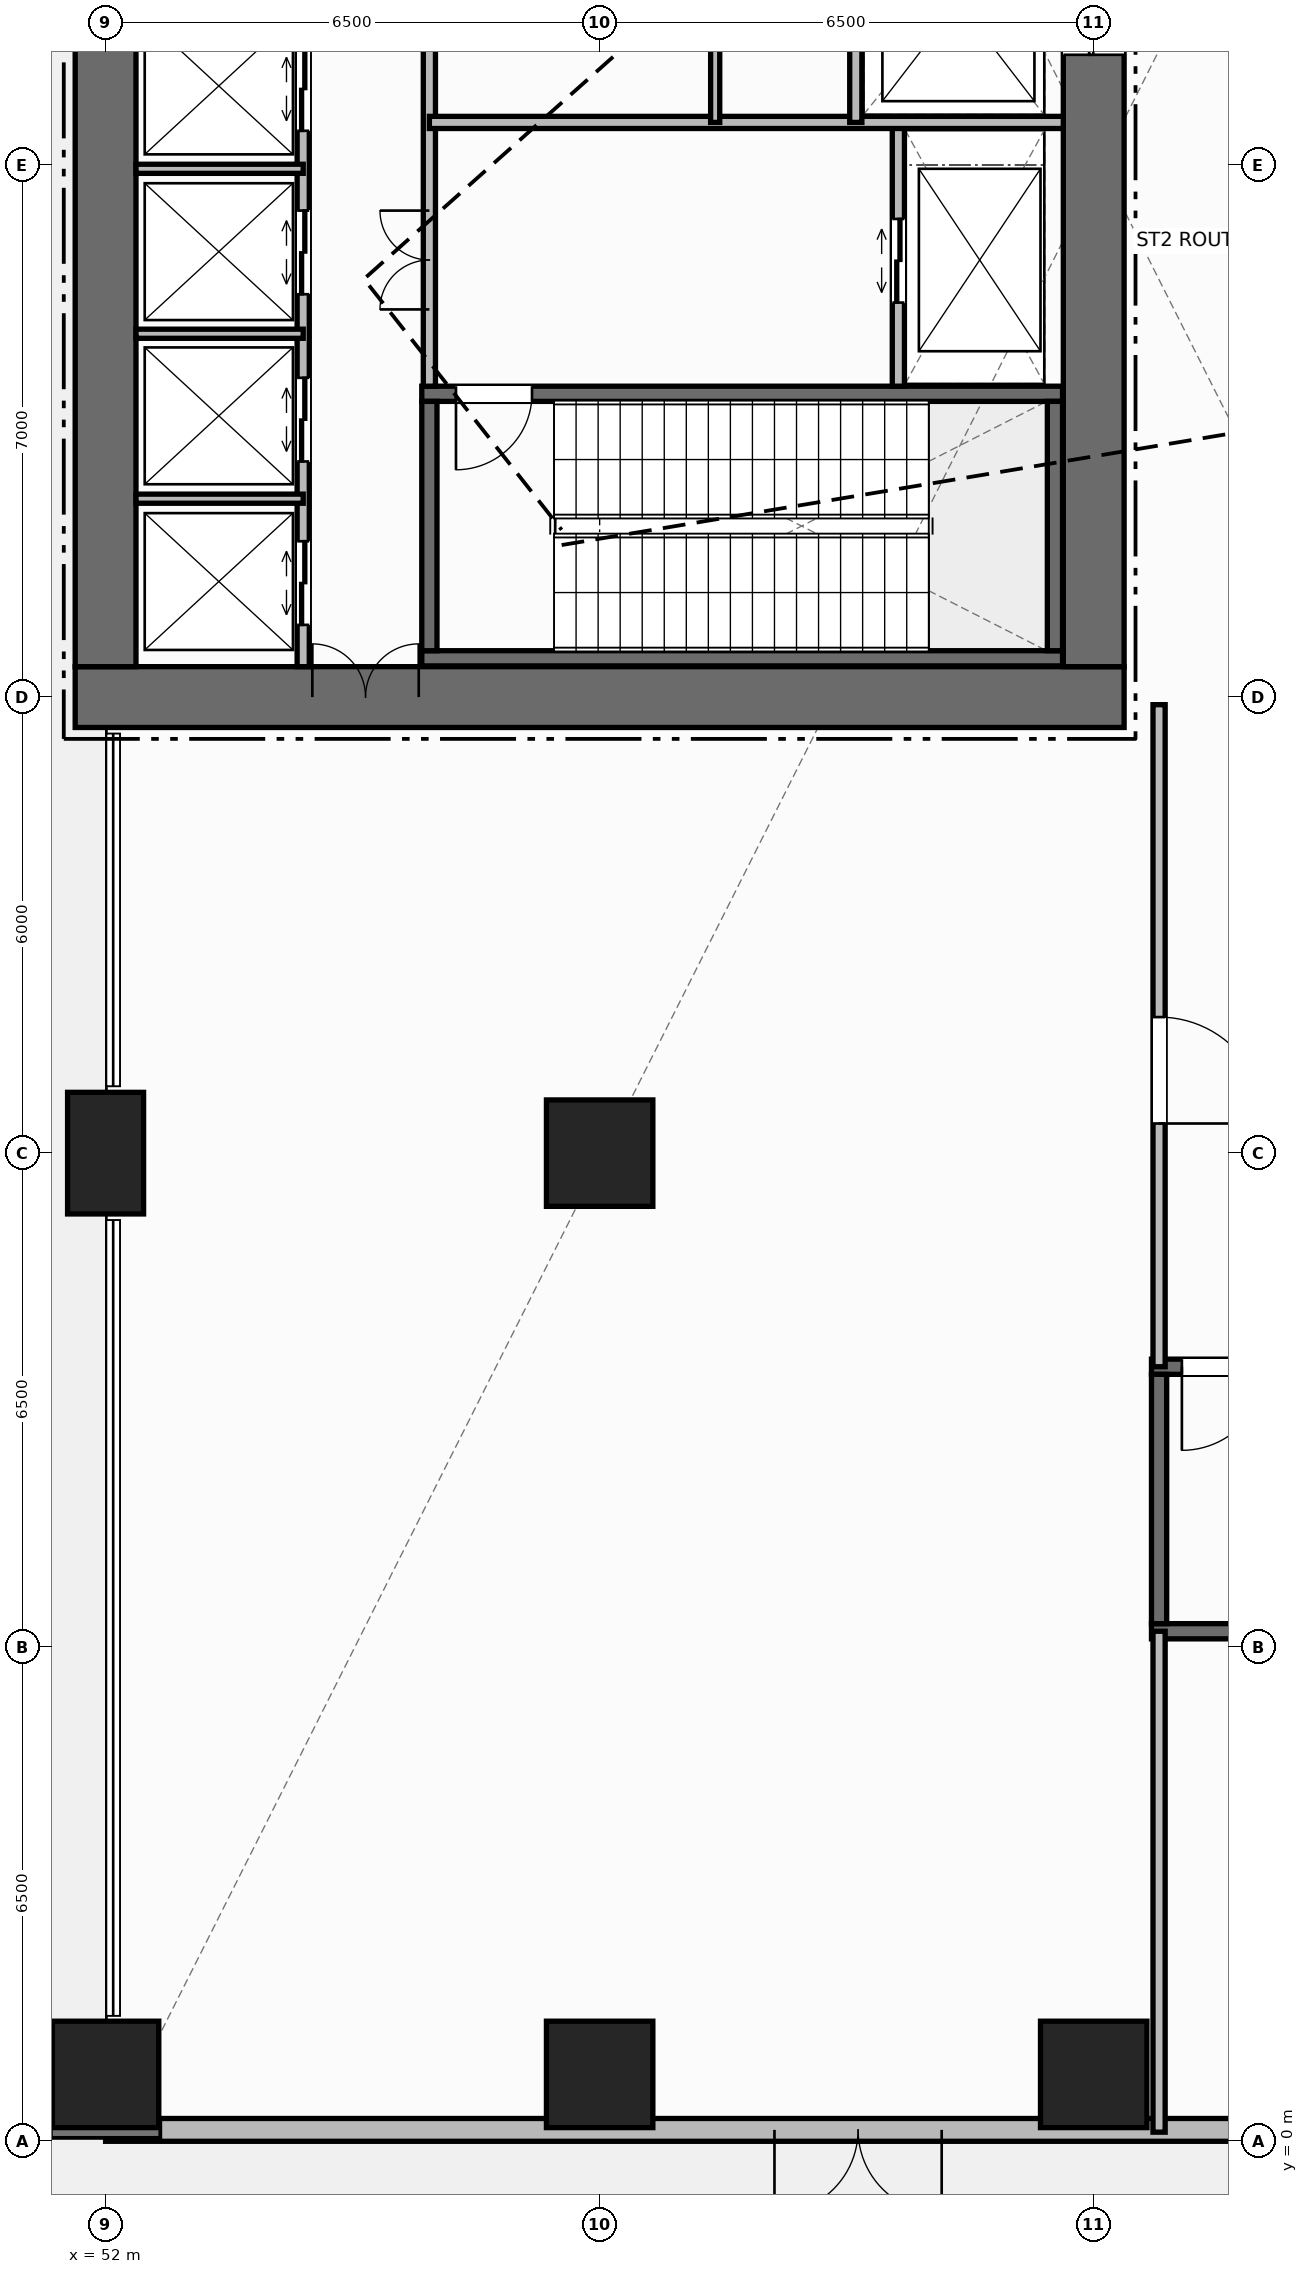
"""IFC4 building model, lengths in metres.
Left out: names, types, materials, properties, quantities, classifications, styles, units other than length and angle.
Written with IfcOpenShell. Run it as: python <this file> out.ifc"""

import sys

from ifc_helpers import new_model, si_unit, direction, frame, frame_2d, origin, origin_2d, place, context, subcontext, project, spatial, rectangle, extrude, element, fill, save


model = new_model("IFC4")
c1 = context("Model", 3, precision=1e-05, world=origin(), true_north=direction((0.0, 1.0)))
c2 = subcontext(c1, "Body", "Model", "MODEL_VIEW")
j1 = project(units=[si_unit("LENGTHUNIT", "METRE"), si_unit("PLANEANGLEUNIT", "RADIAN")], contexts=[c1])
p1 = place(None, origin())
s1 = spatial("IfcSite", under=j1, at=p1, CompositionType="ELEMENT")
p2 = place(p1, origin())
s2 = spatial("IfcBuilding", under=s1, at=p2, CompositionType="ELEMENT")
p3 = place(p2, origin())
s3 = spatial("IfcBuildingStorey", under=s2, at=p3, CompositionType="ELEMENT", Elevation=0.0)
p4 = place(p3, frame((51.6, 19.0, 0.0), z_axis=(0.0, 0.0, 1.0), x_axis=(1.0, 0.0, 0.0)))
e1 = element("IfcWall", 1, at=p4, inside=s3, PredefinedType="SHEAR", context=c2, shape_type="SweptSolid", body=[
    extrude(rectangle(XDim=13.8, YDim=0.8, at=frame_2d((6.9, 0.0))), origin(), (0.0, 0.0, 1.0), 6.0),
])
p5 = place(p4, frame((3.12, 0.0, 0.0)))
e2 = element("IfcOpeningElement", 2, at=p5, cuts=e1, PredefinedType="OPENING", context=c2, shape_type="SweptSolid", body=[
    extrude(rectangle(XDim=1.4, YDim=2.2, at=frame_2d((0.7, 1.1))), frame((0.0, 0.41, 0.0), z_axis=(0.0, -1.0, 0.0), x_axis=(1.0, 0.0, 0.0)), (0.0, 0.0, 1.0), 0.82),
])
p6 = place(p3, frame((52.0, 19.4, 0.0), z_axis=(0.0, 0.0, 1.0), x_axis=(0.0, 1.0, 0.0)))
e3 = element("IfcWall", 3, at=p6, inside=s3, PredefinedType="SHEAR", context=c2, shape_type="SweptSolid", body=[
    extrude(rectangle(XDim=13.2, YDim=0.8, at=frame_2d((6.6, 0.0))), origin(), (0.0, 0.0, 1.0), 6.0),
])
p7 = place(p3, frame((65.0, 19.4, 0.0), z_axis=(0.0, 0.0, 1.0), x_axis=(0.0, 1.0, 0.0)))
e4 = element("IfcWall", 4, at=p7, inside=s3, PredefinedType="SHEAR", context=c2, shape_type="SweptSolid", body=[
    extrude(rectangle(XDim=13.2, YDim=0.8, at=frame_2d((6.6, 0.0))), origin(), (0.0, 0.0, 1.0), 6.0),
])
p8 = place(p7, frame((8.05, 0.0, 0.0)))
e5 = element("IfcOpeningElement", 5, at=p8, cuts=e4, PredefinedType="OPENING", context=c2, shape_type="SweptSolid", body=[
    extrude(rectangle(XDim=1.3, YDim=2.2, at=frame_2d((0.65, 1.1))), frame((0.0, 0.41, 0.0), z_axis=(0.0, -1.0, 0.0), x_axis=(1.0, 0.0, 0.0)), (0.0, 0.0, 1.0), 0.82),
])
p9 = place(p3, frame((56.16, 19.51, 0.0), z_axis=(0.0, 0.0, 1.0), x_axis=(1.0, 0.0, 0.0)))
e6 = element("IfcWall", 6, at=p9, inside=s3, PredefinedType="SHEAR", context=c2, shape_type="SweptSolid", body=[
    extrude(rectangle(XDim=8.43, YDim=0.2, at=frame_2d((4.215, 0.0))), origin(), (0.0, 0.0, 1.0), 6.0),
])
p10 = place(p3, frame((56.16, 22.99, 0.0), z_axis=(0.0, 0.0, 1.0), x_axis=(1.0, 0.0, 0.0)))
e7 = element("IfcWall", 7, at=p10, inside=s3, PredefinedType="SHEAR", context=c2, shape_type="SweptSolid", body=[
    extrude(rectangle(XDim=8.43, YDim=0.2, at=frame_2d((4.215, 0.0))), origin(), (0.0, 0.0, 1.0), 6.0),
])
p11 = place(p10, frame((0.45, 0.0, 0.0)))
e8 = element("IfcOpeningElement", 8, at=p11, cuts=e7, PredefinedType="OPENING", context=c2, shape_type="SweptSolid", body=[
    extrude(rectangle(XDim=1.0, YDim=2.15, at=frame_2d((0.5, 1.075))), frame((0.0, 0.11, 0.0), z_axis=(0.0, -1.0, 0.0), x_axis=(1.0, 0.0, 0.0)), (0.0, 0.0, 1.0), 0.22),
])
for number, where, z_axis, x_axis in (
    (9, (56.26, 19.61, 0.0), (0.0, 0.0, 1.0), (0.0, 1.0, 0.0)),
    (10, (64.49, 19.61, 0.0), (0.0, 0.0, 1.0), (0.0, 1.0, 0.0)),
):
    element("IfcWall", number, at=place(p3, frame(where, z_axis=z_axis, x_axis=x_axis)), inside=s3, PredefinedType="SHEAR", context=c2, shape_type="SweptSolid", body=[
        extrude(rectangle(XDim=3.28, YDim=0.2, at=frame_2d((1.64, 0.0))), origin(), (0.0, 0.0, 1.0), 6.0),
    ])
p12 = place(p3, frame((65.76, 6.71, 0.0), z_axis=(0.0, 0.0, 1.0), x_axis=(1.0, 0.0, 0.0)))
e11 = element("IfcWall", 11, at=p12, inside=s3, PredefinedType="SHEAR", context=c2, shape_type="SweptSolid", body=[
    extrude(rectangle(XDim=8.43, YDim=0.2, at=frame_2d((4.215, 0.0))), origin(), (0.0, 0.0, 1.0), 6.0),
])
p13 = place(p3, frame((65.76, 10.19, 0.0), z_axis=(0.0, 0.0, 1.0), x_axis=(1.0, 0.0, 0.0)))
e12 = element("IfcWall", 12, at=p13, inside=s3, PredefinedType="SHEAR", context=c2, shape_type="SweptSolid", body=[
    extrude(rectangle(XDim=8.43, YDim=0.2, at=frame_2d((4.215, 0.0))), origin(), (0.0, 0.0, 1.0), 6.0),
])
p14 = place(p13, frame((0.4, 0.0, 0.0)))
e13 = element("IfcOpeningElement", 13, at=p14, cuts=e12, PredefinedType="OPENING", context=c2, shape_type="SweptSolid", body=[
    extrude(rectangle(XDim=1.1, YDim=2.15, at=frame_2d((0.55, 1.075))), frame((0.0, 0.11, 0.0), z_axis=(0.0, -1.0, 0.0), x_axis=(1.0, 0.0, 0.0)), (0.0, 0.0, 1.0), 0.22),
])
p15 = place(p3, frame((65.86, 6.81, 0.0), z_axis=(0.0, 0.0, 1.0), x_axis=(0.0, 1.0, 0.0)))
e14 = element("IfcWall", 14, at=p15, inside=s3, PredefinedType="SHEAR", context=c2, shape_type="SweptSolid", body=[
    extrude(rectangle(XDim=3.28, YDim=0.2, at=frame_2d((1.64, 0.0))), origin(), (0.0, 0.0, 1.0), 6.0),
])
p16 = place(p3, frame((58.5, 13.0, 0.0), z_axis=(0.0, 0.0, 1.0), x_axis=(1.0, 0.0, 0.0)))
e15 = element("IfcColumn", 15, at=p16, inside=s3, PredefinedType="COLUMN", context=c2, shape_type="SweptSolid", body=[
    extrude(rectangle(XDim=1.4, YDim=1.4, at=origin_2d()), origin(), (0.0, 0.0, 1.0), 6.0),
])
p17 = place(p3, frame((52.0, 13.0, 0.0), z_axis=(0.0, 0.0, 1.0), x_axis=(1.0, 0.0, 0.0)))
e16 = element("IfcColumn", 16, at=p17, inside=s3, PredefinedType="PILASTER", context=c2, shape_type="SweptSolid", body=[
    extrude(rectangle(XDim=1.0, YDim=1.6, at=origin_2d()), origin(), (0.0, 0.0, 1.0), 6.0),
])
for number, where, z_axis, x_axis in (
    (17, (52.0, 0.88, 0.0), (0.0, 0.0, 1.0), (1.0, 0.0, 0.0)),
    (18, (58.5, 0.88, 0.0), (0.0, 0.0, 1.0), (1.0, 0.0, 0.0)),
    (19, (65.0, 0.88, 0.0), (0.0, 0.0, 1.0), (1.0, 0.0, 0.0)),
):
    element("IfcColumn", number, at=place(p3, frame(where, z_axis=z_axis, x_axis=x_axis)), inside=s3, PredefinedType="COLUMN", context=c2, shape_type="SweptSolid", body=[
        extrude(rectangle(XDim=1.4, YDim=1.4, at=origin_2d()), origin(), (0.0, 0.0, 1.0), 6.0),
    ])
p18 = place(p3, frame((75.0, 0.15, 0.0), z_axis=(0.0, 0.0, 1.0), x_axis=(-1.0, 0.0, 0.0)))
e20 = element("IfcWall", 20, at=p18, inside=s3, PredefinedType="STANDARD", context=c2, shape_type="SweptSolid", body=[
    extrude(rectangle(XDim=23.0, YDim=0.3, at=frame_2d((11.5, 0.0))), origin(), (0.0, 0.0, 1.0), 5.72),
])
p19 = place(p18, frame((12.0, 0.0, 0.0)))
e21 = element("IfcOpeningElement", 21, at=p19, cuts=e20, PredefinedType="OPENING", context=c2, shape_type="SweptSolid", body=[
    extrude(rectangle(XDim=2.2, YDim=2.4, at=frame_2d((1.1, 1.2))), frame((0.0, 0.16, 0.0), z_axis=(0.0, -1.0, 0.0), x_axis=(1.0, 0.0, 0.0)), (0.0, 0.0, 1.0), 0.32),
])
p20 = place(p3, frame((54.6, 19.4, 0.0), z_axis=(0.0, 0.0, 1.0), x_axis=(0.0, 1.0, 0.0)))
e22 = element("IfcWall", 22, at=p20, inside=s3, PredefinedType="STANDARD", context=c2, shape_type="SweptSolid", body=[
    extrude(rectangle(XDim=13.2, YDim=0.16, at=frame_2d((6.6, 0.0))), origin(), (0.0, 0.0, 1.0), 5.72),
])
p21 = place(p20, frame((0.55, 0.0, 0.0)))
e23 = element("IfcOpeningElement", 23, at=p21, cuts=e22, PredefinedType="OPENING", context=c2, shape_type="SweptSolid", body=[
    extrude(rectangle(XDim=1.1, YDim=2.2, at=frame_2d((0.55, 1.1))), frame((0.0, 0.09, 0.0), z_axis=(0.0, -1.0, 0.0), x_axis=(1.0, 0.0, 0.0)), (0.0, 0.0, 1.0), 0.18),
])
p22 = place(p20, frame((2.7, 0.0, 0.0)))
e24 = element("IfcOpeningElement", 24, at=p22, cuts=e22, PredefinedType="OPENING", context=c2, shape_type="SweptSolid", body=[
    extrude(rectangle(XDim=1.1, YDim=2.2, at=frame_2d((0.55, 1.1))), frame((0.0, 0.09, 0.0), z_axis=(0.0, -1.0, 0.0), x_axis=(1.0, 0.0, 0.0)), (0.0, 0.0, 1.0), 0.18),
])
p23 = place(p20, frame((4.9, 0.0, 0.0)))
e25 = element("IfcOpeningElement", 25, at=p23, cuts=e22, PredefinedType="OPENING", context=c2, shape_type="SweptSolid", body=[
    extrude(rectangle(XDim=1.1, YDim=2.2, at=frame_2d((0.55, 1.1))), frame((0.0, 0.09, 0.0), z_axis=(0.0, -1.0, 0.0), x_axis=(1.0, 0.0, 0.0)), (0.0, 0.0, 1.0), 0.18),
])
p24 = place(p20, frame((7.05, 0.0, 0.0)))
e26 = element("IfcOpeningElement", 26, at=p24, cuts=e22, PredefinedType="OPENING", context=c2, shape_type="SweptSolid", body=[
    extrude(rectangle(XDim=1.1, YDim=2.2, at=frame_2d((0.55, 1.1))), frame((0.0, 0.09, 0.0), z_axis=(0.0, -1.0, 0.0), x_axis=(1.0, 0.0, 0.0)), (0.0, 0.0, 1.0), 0.18),
])
p25 = place(p20, frame((9.2, 0.0, 0.0)))
e27 = element("IfcOpeningElement", 27, at=p25, cuts=e22, PredefinedType="OPENING", context=c2, shape_type="SweptSolid", body=[
    extrude(rectangle(XDim=1.1, YDim=2.2, at=frame_2d((0.55, 1.1))), frame((0.0, 0.09, 0.0), z_axis=(0.0, -1.0, 0.0), x_axis=(1.0, 0.0, 0.0)), (0.0, 0.0, 1.0), 0.18),
])
p26 = place(p20, frame((11.4, 0.0, 0.0)))
e28 = element("IfcOpeningElement", 28, at=p26, cuts=e22, PredefinedType="OPENING", context=c2, shape_type="SweptSolid", body=[
    extrude(rectangle(XDim=1.1, YDim=2.2, at=frame_2d((0.55, 1.1))), frame((0.0, 0.09, 0.0), z_axis=(0.0, -1.0, 0.0), x_axis=(1.0, 0.0, 0.0)), (0.0, 0.0, 1.0), 0.18),
])
p27 = place(p3, frame((56.26, 23.09, 0.0), z_axis=(0.0, 0.0, 1.0), x_axis=(0.0, 1.0, 0.0)))
e29 = element("IfcWall", 29, at=p27, inside=s3, PredefinedType="STANDARD", context=c2, shape_type="SweptSolid", body=[
    extrude(rectangle(XDim=9.51, YDim=0.16, at=frame_2d((4.755, 0.0))), origin(), (0.0, 0.0, 1.0), 5.72),
])
p28 = place(p27, frame((1.01, 0.0, 0.0)))
e30 = element("IfcOpeningElement", 30, at=p28, cuts=e29, PredefinedType="OPENING", context=c2, shape_type="SweptSolid", body=[
    extrude(rectangle(XDim=1.3, YDim=2.2, at=frame_2d((0.65, 1.1))), frame((0.0, 0.09, 0.0), z_axis=(0.0, -1.0, 0.0), x_axis=(1.0, 0.0, 0.0)), (0.0, 0.0, 1.0), 0.18),
])
for number, where, z_axis, x_axis in (
    (31, (52.4, 21.61, 0.0), (0.0, 0.0, 1.0), (1.0, 0.0, 0.0)),
    (32, (52.4, 23.78, 0.0), (0.0, 0.0, 1.0), (1.0, 0.0, 0.0)),
    (33, (52.4, 25.95, 0.0), (0.0, 0.0, 1.0), (1.0, 0.0, 0.0)),
):
    element("IfcWall", number, at=place(p3, frame(where, z_axis=z_axis, x_axis=x_axis)), inside=s3, PredefinedType="PARTITIONING", context=c2, shape_type="SweptSolid", body=[
        extrude(rectangle(XDim=2.2, YDim=0.12, at=frame_2d((1.1, 0.0))), origin(), (0.0, 0.0, 1.0), 5.72),
    ])
p29 = place(p3, frame((62.43, 23.09, 0.0), z_axis=(0.0, 0.0, 1.0), x_axis=(0.0, 1.0, 0.0)))
e34 = element("IfcWall", 34, at=p29, inside=s3, PredefinedType="STANDARD", context=c2, shape_type="SweptSolid", body=[
    extrude(rectangle(XDim=3.47, YDim=0.16, at=frame_2d((1.735, 0.0))), origin(), (0.0, 0.0, 1.0), 5.72),
])
p30 = place(p29, frame((1.1, 0.0, 0.0)))
e35 = element("IfcOpeningElement", 35, at=p30, cuts=e34, PredefinedType="OPENING", context=c2, shape_type="SweptSolid", body=[
    extrude(rectangle(XDim=1.1, YDim=2.2, at=frame_2d((0.55, 1.1))), frame((0.0, 0.09, 0.0), z_axis=(0.0, -1.0, 0.0), x_axis=(1.0, 0.0, 0.0)), (0.0, 0.0, 1.0), 0.18),
])
p31 = place(p3, frame((56.26, 26.56, 0.0), z_axis=(0.0, 0.0, 1.0), x_axis=(1.0, 0.0, 0.0)))
e36 = element("IfcWall", 36, at=p31, inside=s3, PredefinedType="STANDARD", context=c2, shape_type="SweptSolid", body=[
    extrude(rectangle(XDim=8.34, YDim=0.16, at=frame_2d((4.17, 0.0))), origin(), (0.0, 0.0, 1.0), 5.72),
])
p32 = place(p3, frame((61.87, 26.56, 0.0), z_axis=(0.0, 0.0, 1.0), x_axis=(0.0, 1.0, 0.0)))
e37 = element("IfcWall", 37, at=p32, inside=s3, PredefinedType="STANDARD", context=c2, shape_type="SweptSolid", body=[
    extrude(rectangle(XDim=6.04, YDim=0.16, at=frame_2d((3.02, 0.0))), origin(), (0.0, 0.0, 1.0), 5.72),
])
p33 = place(p3, frame((60.02, 26.56, 0.0), z_axis=(0.0, 0.0, 1.0), x_axis=(0.0, 1.0, 0.0)))
e38 = element("IfcWall", 38, at=p33, inside=s3, PredefinedType="PARTITIONING", context=c2, shape_type="SweptSolid", body=[
    extrude(rectangle(XDim=6.04, YDim=0.12, at=frame_2d((3.02, 0.0))), origin(), (0.0, 0.0, 1.0), 5.72),
])
p34 = place(p3, frame((65.86, 0.12, 0.0), z_axis=(0.0, 0.0, 1.0), x_axis=(0.0, 1.0, 0.0)))
e39 = element("IfcWall", 39, at=p34, inside=s3, PredefinedType="STANDARD", context=c2, shape_type="SweptSolid", body=[
    extrude(rectangle(XDim=6.59, YDim=0.16, at=frame_2d((3.295, 0.0))), origin(), (0.0, 0.0, 1.0), 5.72),
])
p35 = place(p3, frame((65.86, 10.19, 0.0), z_axis=(0.0, 0.0, 1.0), x_axis=(0.0, 1.0, 0.0)))
e40 = element("IfcWall", 40, at=p35, inside=s3, PredefinedType="STANDARD", context=c2, shape_type="SweptSolid", body=[
    extrude(rectangle(XDim=8.71, YDim=0.16, at=frame_2d((4.355, 0.0))), origin(), (0.0, 0.0, 1.0), 5.72),
])
p36 = place(p35, frame((3.2, 0.0, 0.0)))
e41 = element("IfcOpeningElement", 41, at=p36, cuts=e40, PredefinedType="OPENING", context=c2, shape_type="SweptSolid", body=[
    extrude(rectangle(XDim=1.4, YDim=2.2, at=frame_2d((0.7, 1.1))), frame((0.0, 0.09, 0.0), z_axis=(0.0, -1.0, 0.0), x_axis=(1.0, 0.0, 0.0)), (0.0, 0.0, 1.0), 0.18),
])
p37 = place(p19, origin())
e42 = element("IfcDoor", 42, at=p37, inside=s3, OperationType="DOUBLE_DOOR_SINGLE_SWING", PredefinedType="DOOR", context=c2, shape_type="SweptSolid", body=[
    extrude(rectangle(XDim=2.2, YDim=2.4, at=frame_2d((1.1, 1.2))), frame((0.0, 0.025, 0.0), z_axis=(0.0, -1.0, 0.0), x_axis=(1.0, 0.0, 0.0)), (0.0, 0.0, 1.0), 0.05),
])
fill(e21, e42)
p38 = place(p5, origin())
e43 = element("IfcDoor", 43, at=p38, inside=s3, OperationType="DOUBLE_DOOR_SINGLE_SWING", PredefinedType="DOOR", context=c2, shape_type="SweptSolid", body=[
    extrude(rectangle(XDim=1.4, YDim=2.2, at=frame_2d((0.7, 1.1))), frame((0.0, 0.125, 0.0), z_axis=(0.0, -1.0, 0.0), x_axis=(1.0, 0.0, 0.0)), (0.0, 0.0, 1.0), 0.05),
])
fill(e2, e43)
p39 = place(p21, origin())
e44 = element("IfcDoor", 44, at=p39, inside=s3, OperationType="DOUBLE_DOOR_SLIDING", PredefinedType="DOOR", context=c2, shape_type="SweptSolid", body=[
    extrude(rectangle(XDim=1.1, YDim=2.2, at=frame_2d((0.55, 1.1))), frame((0.0, 0.025, 0.0), z_axis=(0.0, -1.0, 0.0), x_axis=(1.0, 0.0, 0.0)), (0.0, 0.0, 1.0), 0.05),
])
fill(e23, e44)
p40 = place(p22, origin())
e45 = element("IfcDoor", 45, at=p40, inside=s3, OperationType="DOUBLE_DOOR_SLIDING", PredefinedType="DOOR", context=c2, shape_type="SweptSolid", body=[
    extrude(rectangle(XDim=1.1, YDim=2.2, at=frame_2d((0.55, 1.1))), frame((0.0, 0.025, 0.0), z_axis=(0.0, -1.0, 0.0), x_axis=(1.0, 0.0, 0.0)), (0.0, 0.0, 1.0), 0.05),
])
fill(e24, e45)
p41 = place(p23, origin())
e46 = element("IfcDoor", 46, at=p41, inside=s3, OperationType="DOUBLE_DOOR_SLIDING", PredefinedType="DOOR", context=c2, shape_type="SweptSolid", body=[
    extrude(rectangle(XDim=1.1, YDim=2.2, at=frame_2d((0.55, 1.1))), frame((0.0, 0.025, 0.0), z_axis=(0.0, -1.0, 0.0), x_axis=(1.0, 0.0, 0.0)), (0.0, 0.0, 1.0), 0.05),
])
fill(e25, e46)
p42 = place(p24, origin())
e47 = element("IfcDoor", 47, at=p42, inside=s3, OperationType="DOUBLE_DOOR_SLIDING", PredefinedType="DOOR", context=c2, shape_type="SweptSolid", body=[
    extrude(rectangle(XDim=1.1, YDim=2.2, at=frame_2d((0.55, 1.1))), frame((0.0, 0.025, 0.0), z_axis=(0.0, -1.0, 0.0), x_axis=(1.0, 0.0, 0.0)), (0.0, 0.0, 1.0), 0.05),
])
fill(e26, e47)
p43 = place(p11, origin())
e48 = element("IfcDoor", 48, at=p43, inside=s3, OperationType="SINGLE_SWING_RIGHT", PredefinedType="DOOR", context=c2, shape_type="SweptSolid", body=[
    extrude(rectangle(XDim=1.0, YDim=2.15, at=frame_2d((0.5, 1.075))), frame((0.0, 0.025, 0.0), z_axis=(0.0, -1.0, 0.0), x_axis=(1.0, 0.0, 0.0)), (0.0, 0.0, 1.0), 0.05),
])
fill(e8, e48)
p44 = place(p30, origin())
e49 = element("IfcDoor", 49, at=p44, inside=s3, OperationType="DOUBLE_DOOR_SLIDING", PredefinedType="DOOR", context=c2, shape_type="SweptSolid", body=[
    extrude(rectangle(XDim=1.1, YDim=2.2, at=frame_2d((0.55, 1.1))), frame((0.0, 0.025, 0.0), z_axis=(0.0, -1.0, 0.0), x_axis=(1.0, 0.0, 0.0)), (0.0, 0.0, 1.0), 0.05),
])
fill(e35, e49)
p45 = place(p28, origin())
e50 = element("IfcDoor", 50, at=p45, inside=s3, OperationType="DOUBLE_DOOR_SINGLE_SWING", PredefinedType="DOOR", context=c2, shape_type="SweptSolid", body=[
    extrude(rectangle(XDim=1.3, YDim=2.2, at=frame_2d((0.65, 1.1))), frame((0.0, 0.025, 0.0), z_axis=(0.0, -1.0, 0.0), x_axis=(1.0, 0.0, 0.0)), (0.0, 0.0, 1.0), 0.05),
])
fill(e30, e50)
p46 = place(p8, origin())
e51 = element("IfcDoor", 51, at=p46, inside=s3, OperationType="DOUBLE_DOOR_SLIDING", PredefinedType="DOOR", context=c2, shape_type="SweptSolid", body=[
    extrude(rectangle(XDim=1.3, YDim=2.2, at=frame_2d((0.65, 1.1))), frame((0.0, 0.025, 0.0), z_axis=(0.0, -1.0, 0.0), x_axis=(1.0, 0.0, 0.0)), (0.0, 0.0, 1.0), 0.05),
])
fill(e5, e51)
p47 = place(p14, origin())
e52 = element("IfcDoor", 52, at=p47, inside=s3, OperationType="SINGLE_SWING_RIGHT", PredefinedType="DOOR", context=c2, shape_type="SweptSolid", body=[
    extrude(rectangle(XDim=1.1, YDim=2.15, at=frame_2d((0.55, 1.075))), frame((0.0, 0.025, 0.0), z_axis=(0.0, -1.0, 0.0), x_axis=(1.0, 0.0, 0.0)), (0.0, 0.0, 1.0), 0.05),
])
fill(e13, e52)
p48 = place(p36, origin())
e53 = element("IfcDoor", 53, at=p48, inside=s3, OperationType="SINGLE_SWING_RIGHT", PredefinedType="DOOR", context=c2, shape_type="SweptSolid", body=[
    extrude(rectangle(XDim=1.4, YDim=2.2, at=frame_2d((0.7, 1.1))), frame((0.0, 0.025, 0.0), z_axis=(0.0, -1.0, 0.0), x_axis=(1.0, 0.0, 0.0)), (0.0, 0.0, 1.0), 0.05),
])
fill(e41, e53)
save(model, sys.argv[1])
